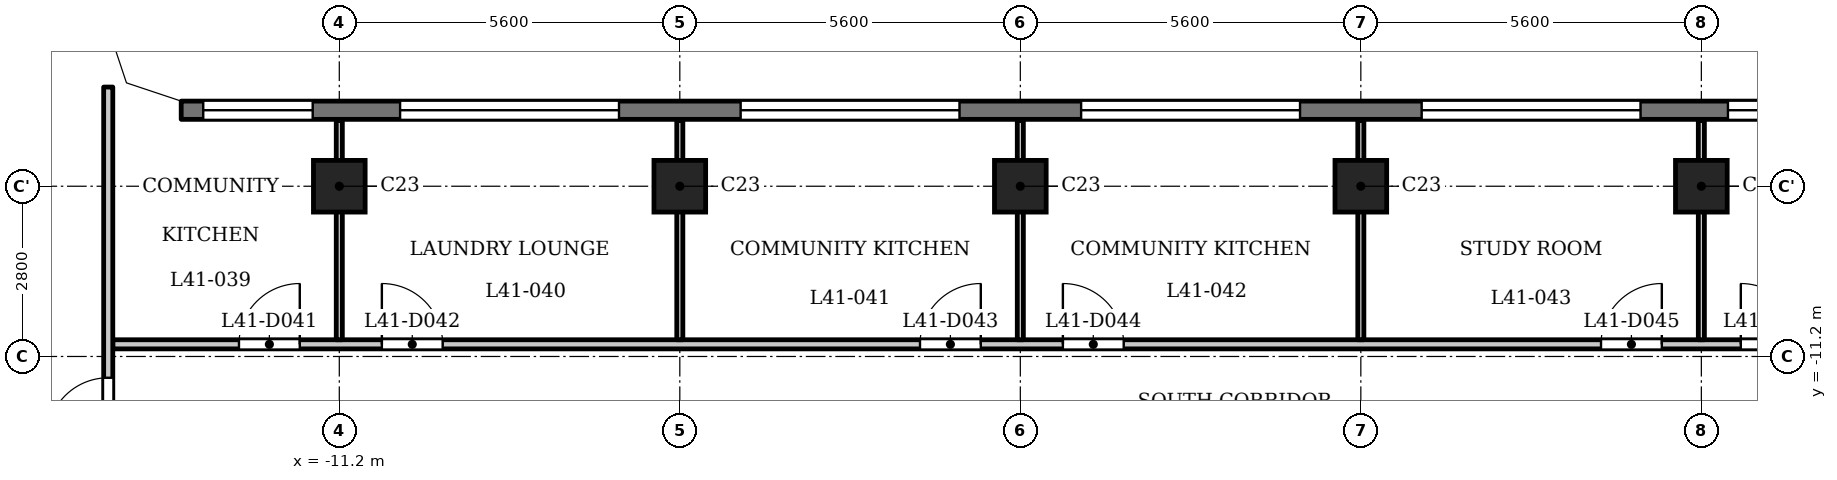
"""IFC4 building model, lengths in metres.
Left out: names, types, materials, properties, quantities, classifications, styles, units other than length and angle.
Written with IfcOpenShell. Run it as: python <this file> out.ifc"""

import sys

from ifc_helpers import new_model, si_unit, direction, frame, frame_2d, origin, origin_2d, place, context, subcontext, project, spatial, polyline, rectangle, outline, extrude, element, fill, save


model = new_model("IFC4")
c1 = context("Model", 3, precision=1e-05, world=origin(), true_north=direction((0.0, 1.0)))
c2 = subcontext(c1, "Body", "Model", "MODEL_VIEW")
j1 = project(units=[si_unit("LENGTHUNIT", "METRE"), si_unit("PLANEANGLEUNIT", "RADIAN")], contexts=[c1])
p1 = place(None, origin())
s1 = spatial("IfcSite", under=j1, at=p1, CompositionType="ELEMENT")
p2 = place(p1, origin())
s2 = spatial("IfcBuilding", under=s1, at=p2, CompositionType="ELEMENT")
p3 = place(p2, frame((0.0, 0.0, 160.6)))
s3 = spatial("IfcBuildingStorey", under=s2, at=p3, CompositionType="ELEMENT", Elevation=160.6)
for number, where, z_axis, x_axis in (
    (1, (-11.2, -8.4, 0.0), (0.0, 0.0, 1.0), (1.0, 0.0, 0.0)),
    (2, (-5.6, -8.4, 0.0), (0.0, 0.0, 1.0), (1.0, 0.0, 0.0)),
    (3, (0.0, -8.4, 0.0), (0.0, 0.0, 1.0), (1.0, 0.0, 0.0)),
    (4, (5.6, -8.4, 0.0), (0.0, 0.0, 1.0), (1.0, 0.0, 0.0)),
    (5, (11.2, -8.4, 0.0), (0.0, 0.0, 1.0), (1.0, 0.0, 0.0)),
):
    element("IfcColumn", number, at=place(p3, frame(where, z_axis=z_axis, x_axis=x_axis)), inside=s3, PredefinedType="COLUMN", context=c2, shape_type="SweptSolid", body=[
        extrude(rectangle(XDim=0.85, YDim=0.85, at=origin_2d()), origin(), (0.0, 0.0, 1.0), 3.5),
    ])
p4 = place(p3, frame((13.8, -7.15, 0.0), z_axis=(0.0, 0.0, 1.0), x_axis=(-1.0, 0.0, 0.0)))
e6 = element("IfcWall", 6, at=p4, inside=s3, PredefinedType="SOLIDWALL", context=c2, shape_type="SweptSolid", body=[
    extrude(rectangle(XDim=27.6, YDim=0.3, at=frame_2d((13.8, 0.0))), origin(), (0.0, 0.0, 1.0), 3.2),
])
p5 = place(p4, frame((0.363, 0.0, 0.9)))
e7 = element("IfcOpeningElement", 7, at=p5, cuts=e6, PredefinedType="OPENING", context=c2, shape_type="SweptSolid", body=[
    extrude(rectangle(XDim=1.8, YDim=1.25, at=frame_2d((0.9, 0.625))), frame((0.0, 0.16, 0.0), z_axis=(0.0, -1.0, 0.0), x_axis=(1.0, 0.0, 0.0)), (0.0, 0.0, 1.0), 0.32),
])
p6 = place(p4, frame((3.6, 0.0, 1.2)))
e8 = element("IfcOpeningElement", 8, at=p6, cuts=e6, PredefinedType="OPENING", context=c2, shape_type="SweptSolid", body=[
    extrude(rectangle(XDim=3.6, YDim=0.95, at=frame_2d((1.8, 0.475))), frame((0.0, 0.16, 0.0), z_axis=(0.0, -1.0, 0.0), x_axis=(1.0, 0.0, 0.0)), (0.0, 0.0, 1.0), 0.32),
])
p7 = place(p4, frame((9.2, 0.0, 1.2)))
e9 = element("IfcOpeningElement", 9, at=p7, cuts=e6, PredefinedType="OPENING", context=c2, shape_type="SweptSolid", body=[
    extrude(rectangle(XDim=3.6, YDim=0.95, at=frame_2d((1.8, 0.475))), frame((0.0, 0.16, 0.0), z_axis=(0.0, -1.0, 0.0), x_axis=(1.0, 0.0, 0.0)), (0.0, 0.0, 1.0), 0.32),
])
p8 = place(p4, frame((14.8, 0.0, 1.2)))
e10 = element("IfcOpeningElement", 10, at=p8, cuts=e6, PredefinedType="OPENING", context=c2, shape_type="SweptSolid", body=[
    extrude(rectangle(XDim=3.6, YDim=0.95, at=frame_2d((1.8, 0.475))), frame((0.0, 0.16, 0.0), z_axis=(0.0, -1.0, 0.0), x_axis=(1.0, 0.0, 0.0)), (0.0, 0.0, 1.0), 0.32),
])
p9 = place(p4, frame((20.4, 0.0, 1.2)))
e11 = element("IfcOpeningElement", 11, at=p9, cuts=e6, PredefinedType="OPENING", context=c2, shape_type="SweptSolid", body=[
    extrude(rectangle(XDim=3.6, YDim=0.95, at=frame_2d((1.8, 0.475))), frame((0.0, 0.16, 0.0), z_axis=(0.0, -1.0, 0.0), x_axis=(1.0, 0.0, 0.0)), (0.0, 0.0, 1.0), 0.32),
])
p10 = place(p4, frame((25.438, 0.0, 0.9)))
e12 = element("IfcOpeningElement", 12, at=p10, cuts=e6, PredefinedType="OPENING", context=c2, shape_type="SweptSolid", body=[
    extrude(rectangle(XDim=1.8, YDim=1.25, at=frame_2d((0.9, 0.625))), frame((0.0, 0.16, 0.0), z_axis=(0.0, -1.0, 0.0), x_axis=(1.0, 0.0, 0.0)), (0.0, 0.0, 1.0), 0.32),
])
p11 = place(p3, frame((-14.925, -11.0, 0.0), z_axis=(0.0, 0.0, 1.0), x_axis=(1.0, 0.0, 0.0)))
e13 = element("IfcWall", 13, at=p11, inside=s3, PredefinedType="PARTITIONING", context=c2, shape_type="SweptSolid", body=[
    extrude(rectangle(XDim=29.85, YDim=0.15, at=frame_2d((14.925, 0.0))), origin(), (0.0, 0.0, 1.0), 3.2),
])
p12 = place(p11, frame((2.075, 0.0, 0.0)))
e14 = element("IfcOpeningElement", 14, at=p12, cuts=e13, PredefinedType="OPENING", context=c2, shape_type="SweptSolid", body=[
    extrude(rectangle(XDim=1.0, YDim=2.1, at=frame_2d((0.5, 1.05))), frame((0.0, 0.085, 0.0), z_axis=(0.0, -1.0, 0.0), x_axis=(1.0, 0.0, 0.0)), (0.0, 0.0, 1.0), 0.17),
])
p13 = place(p11, frame((4.425, 0.0, 0.0)))
e15 = element("IfcOpeningElement", 15, at=p13, cuts=e13, PredefinedType="OPENING", context=c2, shape_type="SweptSolid", body=[
    extrude(rectangle(XDim=1.0, YDim=2.1, at=frame_2d((0.5, 1.05))), frame((0.0, 0.085, 0.0), z_axis=(0.0, -1.0, 0.0), x_axis=(1.0, 0.0, 0.0)), (0.0, 0.0, 1.0), 0.17),
])
p14 = place(p11, frame((13.275, 0.0, 0.0)))
e16 = element("IfcOpeningElement", 16, at=p14, cuts=e13, PredefinedType="OPENING", context=c2, shape_type="SweptSolid", body=[
    extrude(rectangle(XDim=1.0, YDim=2.1, at=frame_2d((0.5, 1.05))), frame((0.0, 0.085, 0.0), z_axis=(0.0, -1.0, 0.0), x_axis=(1.0, 0.0, 0.0)), (0.0, 0.0, 1.0), 0.17),
])
p15 = place(p11, frame((15.625, 0.0, 0.0)))
e17 = element("IfcOpeningElement", 17, at=p15, cuts=e13, PredefinedType="OPENING", context=c2, shape_type="SweptSolid", body=[
    extrude(rectangle(XDim=1.0, YDim=2.1, at=frame_2d((0.5, 1.05))), frame((0.0, 0.085, 0.0), z_axis=(0.0, -1.0, 0.0), x_axis=(1.0, 0.0, 0.0)), (0.0, 0.0, 1.0), 0.17),
])
p16 = place(p11, frame((24.475, 0.0, 0.0)))
e18 = element("IfcOpeningElement", 18, at=p16, cuts=e13, PredefinedType="OPENING", context=c2, shape_type="SweptSolid", body=[
    extrude(rectangle(XDim=1.0, YDim=2.1, at=frame_2d((0.5, 1.05))), frame((0.0, 0.085, 0.0), z_axis=(0.0, -1.0, 0.0), x_axis=(1.0, 0.0, 0.0)), (0.0, 0.0, 1.0), 0.17),
])
p17 = place(p11, frame((26.774, 0.0, 0.0)))
e19 = element("IfcOpeningElement", 19, at=p17, cuts=e13, PredefinedType="OPENING", context=c2, shape_type="SweptSolid", body=[
    extrude(rectangle(XDim=1.0, YDim=2.1, at=frame_2d((0.5, 1.05))), frame((0.0, 0.085, 0.0), z_axis=(0.0, -1.0, 0.0), x_axis=(1.0, 0.0, 0.0)), (0.0, 0.0, 1.0), 0.17),
])
p18 = place(p3, frame((-15.0, -13.125, 0.0), z_axis=(0.0, 0.0, 1.0), x_axis=(0.0, 1.0, 0.0)))
e20 = element("IfcWall", 20, at=p18, inside=s3, PredefinedType="PARTITIONING", context=c2, shape_type="SweptSolid", body=[
    extrude(rectangle(XDim=6.356, YDim=0.15, at=frame_2d((3.178, 0.0))), origin(), (0.0, 0.0, 1.0), 3.2),
])
p19 = place(p18, frame((0.575, 0.0, 0.0)))
e21 = element("IfcOpeningElement", 21, at=p19, cuts=e20, PredefinedType="OPENING", context=c2, shape_type="SweptSolid", body=[
    extrude(rectangle(XDim=1.0, YDim=2.1, at=frame_2d((0.5, 1.05))), frame((0.0, 0.085, 0.0), z_axis=(0.0, -1.0, 0.0), x_axis=(1.0, 0.0, 0.0)), (0.0, 0.0, 1.0), 0.17),
])
for number, where, z_axis, x_axis in (
    (22, (-11.2, -10.925, 0.0), (0.0, 0.0, 1.0), (0.0, 1.0, 0.0)),
    (23, (-5.6, -10.925, 0.0), (0.0, 0.0, 1.0), (0.0, 1.0, 0.0)),
    (24, (0.0, -10.925, 0.0), (0.0, 0.0, 1.0), (0.0, 1.0, 0.0)),
    (25, (5.6, -10.925, 0.0), (0.0, 0.0, 1.0), (0.0, 1.0, 0.0)),
    (26, (11.2, -10.925, 0.0), (0.0, 0.0, 1.0), (0.0, 1.0, 0.0)),
):
    element("IfcWall", number, at=place(p3, frame(where, z_axis=z_axis, x_axis=x_axis)), inside=s3, PredefinedType="PARTITIONING", context=c2, shape_type="SweptSolid", body=[
        extrude(rectangle(XDim=3.605, YDim=0.1, at=frame_2d((1.802, 0.0))), origin(), (0.0, 0.0, 1.0), 3.2),
    ])
p20 = place(p3, origin())
e27 = element("IfcWall", 27, at=p20, inside=s3, PredefinedType="SOLIDWALL", context=c2, shape_type="SweptSolid", body=[
    extrude(outline(polyline([(-14.937, -6.937), (-13.849, -7.3), (-13.8, -7.3), (-13.8, -7.0), (-14.7, -6.7), (-15.0, -5.8), (-15.3, -5.8), (-15.3, -5.849), (-14.937, -6.937)])), origin(), (0.0, 0.0, 1.0), 3.2),
])
p21 = place(p19, origin())
e28 = element("IfcDoor", 28, at=p21, inside=s3, OperationType="SINGLE_SWING_RIGHT", PredefinedType="DOOR", context=c2, shape_type="SweptSolid", body=[
    extrude(rectangle(XDim=1.0, YDim=2.1, at=frame_2d((0.5, 1.05))), frame((0.0, 0.025, 0.0), z_axis=(0.0, -1.0, 0.0), x_axis=(1.0, 0.0, 0.0)), (0.0, 0.0, 1.0), 0.05),
])
fill(e21, e28)
p22 = place(p12, origin())
e29 = element("IfcDoor", 29, at=p22, inside=s3, OperationType="SINGLE_SWING_LEFT", PredefinedType="DOOR", context=c2, shape_type="SweptSolid", body=[
    extrude(rectangle(XDim=1.0, YDim=2.1, at=frame_2d((0.5, 1.05))), frame((0.0, 0.025, 0.0), z_axis=(0.0, -1.0, 0.0), x_axis=(1.0, 0.0, 0.0)), (0.0, 0.0, 1.0), 0.05),
])
fill(e14, e29)
p23 = place(p13, origin())
e30 = element("IfcDoor", 30, at=p23, inside=s3, OperationType="SINGLE_SWING_RIGHT", PredefinedType="DOOR", context=c2, shape_type="SweptSolid", body=[
    extrude(rectangle(XDim=1.0, YDim=2.1, at=frame_2d((0.5, 1.05))), frame((0.0, 0.025, 0.0), z_axis=(0.0, -1.0, 0.0), x_axis=(1.0, 0.0, 0.0)), (0.0, 0.0, 1.0), 0.05),
])
fill(e15, e30)
p24 = place(p14, origin())
e31 = element("IfcDoor", 31, at=p24, inside=s3, OperationType="SINGLE_SWING_LEFT", PredefinedType="DOOR", context=c2, shape_type="SweptSolid", body=[
    extrude(rectangle(XDim=1.0, YDim=2.1, at=frame_2d((0.5, 1.05))), frame((0.0, 0.025, 0.0), z_axis=(0.0, -1.0, 0.0), x_axis=(1.0, 0.0, 0.0)), (0.0, 0.0, 1.0), 0.05),
])
fill(e16, e31)
p25 = place(p15, origin())
e32 = element("IfcDoor", 32, at=p25, inside=s3, OperationType="SINGLE_SWING_RIGHT", PredefinedType="DOOR", context=c2, shape_type="SweptSolid", body=[
    extrude(rectangle(XDim=1.0, YDim=2.1, at=frame_2d((0.5, 1.05))), frame((0.0, 0.025, 0.0), z_axis=(0.0, -1.0, 0.0), x_axis=(1.0, 0.0, 0.0)), (0.0, 0.0, 1.0), 0.05),
])
fill(e17, e32)
p26 = place(p16, origin())
e33 = element("IfcDoor", 33, at=p26, inside=s3, OperationType="SINGLE_SWING_LEFT", PredefinedType="DOOR", context=c2, shape_type="SweptSolid", body=[
    extrude(rectangle(XDim=1.0, YDim=2.1, at=frame_2d((0.5, 1.05))), frame((0.0, 0.025, 0.0), z_axis=(0.0, -1.0, 0.0), x_axis=(1.0, 0.0, 0.0)), (0.0, 0.0, 1.0), 0.05),
])
fill(e18, e33)
p27 = place(p17, origin())
e34 = element("IfcDoor", 34, at=p27, inside=s3, OperationType="SINGLE_SWING_RIGHT", PredefinedType="DOOR", context=c2, shape_type="SweptSolid", body=[
    extrude(rectangle(XDim=1.0, YDim=2.1, at=frame_2d((0.5, 1.05))), frame((0.0, 0.025, 0.0), z_axis=(0.0, -1.0, 0.0), x_axis=(1.0, 0.0, 0.0)), (0.0, 0.0, 1.0), 0.05),
])
fill(e19, e34)
p28 = place(p5, origin())
e35 = element("IfcWindow", 35, at=p28, inside=s3, PartitioningType="SINGLE_PANEL", PredefinedType="WINDOW", context=c2, shape_type="SweptSolid", body=[
    extrude(rectangle(XDim=1.8, YDim=1.25, at=frame_2d((0.9, 0.625))), frame((0.0, 0.03, 0.0), z_axis=(0.0, -1.0, 0.0), x_axis=(1.0, 0.0, 0.0)), (0.0, 0.0, 1.0), 0.06),
])
fill(e7, e35)
p29 = place(p6, origin())
e36 = element("IfcWindow", 36, at=p29, inside=s3, PartitioningType="SINGLE_PANEL", PredefinedType="WINDOW", context=c2, shape_type="SweptSolid", body=[
    extrude(rectangle(XDim=3.6, YDim=0.95, at=frame_2d((1.8, 0.475))), frame((0.0, 0.03, 0.0), z_axis=(0.0, -1.0, 0.0), x_axis=(1.0, 0.0, 0.0)), (0.0, 0.0, 1.0), 0.06),
])
fill(e8, e36)
p30 = place(p7, origin())
e37 = element("IfcWindow", 37, at=p30, inside=s3, PartitioningType="SINGLE_PANEL", PredefinedType="WINDOW", context=c2, shape_type="SweptSolid", body=[
    extrude(rectangle(XDim=3.6, YDim=0.95, at=frame_2d((1.8, 0.475))), frame((0.0, 0.03, 0.0), z_axis=(0.0, -1.0, 0.0), x_axis=(1.0, 0.0, 0.0)), (0.0, 0.0, 1.0), 0.06),
])
fill(e9, e37)
p31 = place(p8, origin())
e38 = element("IfcWindow", 38, at=p31, inside=s3, PartitioningType="SINGLE_PANEL", PredefinedType="WINDOW", context=c2, shape_type="SweptSolid", body=[
    extrude(rectangle(XDim=3.6, YDim=0.95, at=frame_2d((1.8, 0.475))), frame((0.0, 0.03, 0.0), z_axis=(0.0, -1.0, 0.0), x_axis=(1.0, 0.0, 0.0)), (0.0, 0.0, 1.0), 0.06),
])
fill(e10, e38)
p32 = place(p9, origin())
e39 = element("IfcWindow", 39, at=p32, inside=s3, PartitioningType="SINGLE_PANEL", PredefinedType="WINDOW", context=c2, shape_type="SweptSolid", body=[
    extrude(rectangle(XDim=3.6, YDim=0.95, at=frame_2d((1.8, 0.475))), frame((0.0, 0.03, 0.0), z_axis=(0.0, -1.0, 0.0), x_axis=(1.0, 0.0, 0.0)), (0.0, 0.0, 1.0), 0.06),
])
fill(e11, e39)
p33 = place(p10, origin())
e40 = element("IfcWindow", 40, at=p33, inside=s3, PartitioningType="SINGLE_PANEL", PredefinedType="WINDOW", context=c2, shape_type="SweptSolid", body=[
    extrude(rectangle(XDim=1.8, YDim=1.25, at=frame_2d((0.9, 0.625))), frame((0.0, 0.03, 0.0), z_axis=(0.0, -1.0, 0.0), x_axis=(1.0, 0.0, 0.0)), (0.0, 0.0, 1.0), 0.06),
])
fill(e12, e40)
save(model, sys.argv[1])
